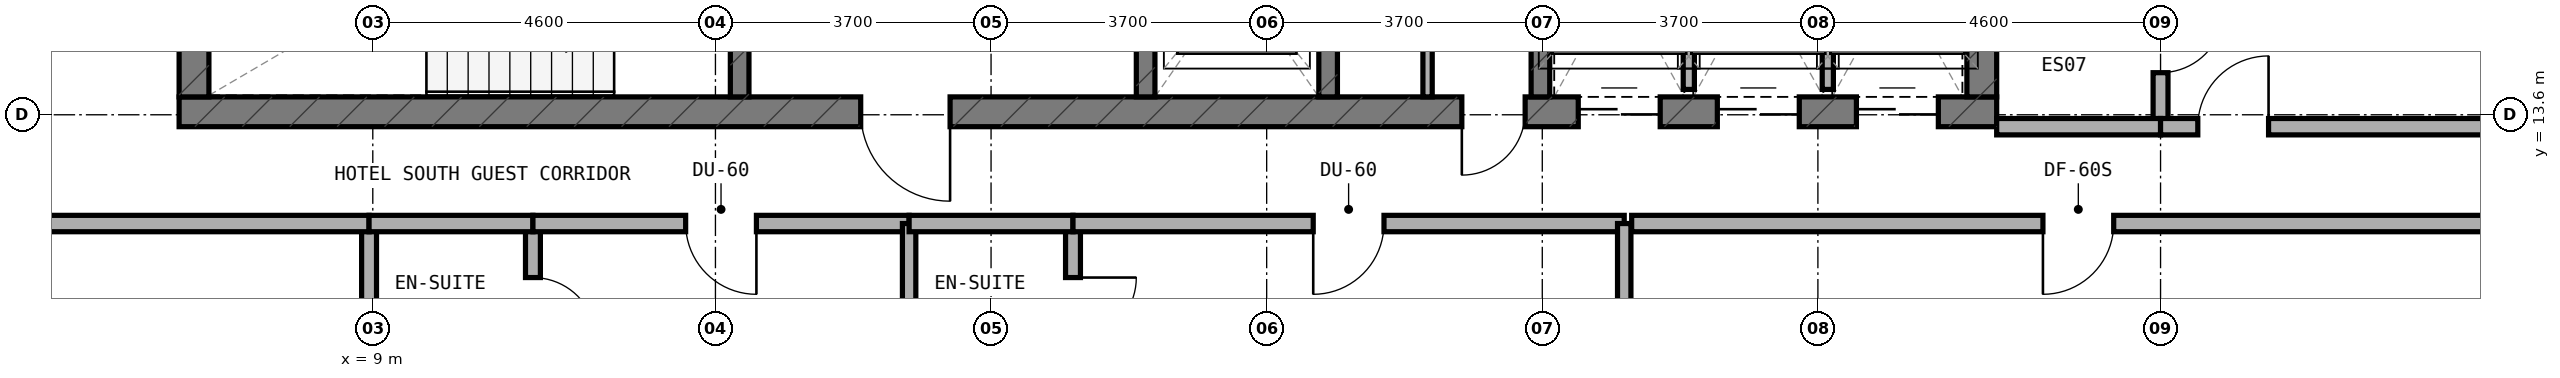
"""IFC4 building model, lengths in metres.
Left out: names, types, materials, properties, quantities, classifications, styles, units other than length and angle.
Written with IfcOpenShell. Run it as: python <this file> out.ifc"""

import sys

from ifc_helpers import new_model, si_unit, direction, frame, frame_2d, origin, place, context, subcontext, project, spatial, rectangle, extrude, element, fill, save


model = new_model("IFC4")
c1 = context("Model", 3, precision=1e-05, world=origin(), true_north=direction((0.0, 1.0)))
c2 = subcontext(c1, "Body", "Model", "MODEL_VIEW")
j1 = project(units=[si_unit("LENGTHUNIT", "METRE"), si_unit("PLANEANGLEUNIT", "RADIAN")], contexts=[c1])
p1 = place(None, origin())
s1 = spatial("IfcSite", under=j1, at=p1, CompositionType="ELEMENT")
p2 = place(p1, origin())
s2 = spatial("IfcBuilding", under=s1, at=p2, CompositionType="ELEMENT")
p3 = place(p2, frame((0.0, 0.0, 246.8)))
s3 = spatial("IfcBuildingStorey", under=s2, at=p3, CompositionType="ELEMENT", Elevation=246.8)
p4 = place(p3, frame((6.4, 13.64, 0.0), z_axis=(0.0, 0.0, 1.0), x_axis=(1.0, 0.0, 0.0)))
e1 = element("IfcWall", 1, at=p4, inside=s3, PredefinedType="SHEAR", context=c2, shape_type="SweptSolid", body=[
    extrude(rectangle(XDim=24.4, YDim=0.4, at=frame_2d((12.2, 0.0))), origin(), (0.0, 0.0, 1.0), 3.6),
])
p5 = place(p4, frame((9.15, 0.0, 0.0)))
e2 = element("IfcOpeningElement", 2, at=p5, cuts=e1, PredefinedType="OPENING", context=c2, shape_type="SweptSolid", body=[
    extrude(rectangle(XDim=1.2, YDim=2.15, at=frame_2d((0.6, 1.075))), frame((0.0, 0.21, 0.0), z_axis=(0.0, -1.0, 0.0), x_axis=(1.0, 0.0, 0.0)), (0.0, 0.0, 1.0), 0.42),
])
p6 = place(p4, frame((17.22, 0.0, 0.0)))
e3 = element("IfcOpeningElement", 3, at=p6, cuts=e1, PredefinedType="OPENING", context=c2, shape_type="SweptSolid", body=[
    extrude(rectangle(XDim=0.85, YDim=2.1, at=frame_2d((0.425, 1.05))), frame((0.0, 0.21, 0.0), z_axis=(0.0, -1.0, 0.0), x_axis=(1.0, 0.0, 0.0)), (0.0, 0.0, 1.0), 0.42),
])
p7 = place(p4, frame((18.783, 0.0, 0.0)))
e4 = element("IfcOpeningElement", 4, at=p7, cuts=e1, PredefinedType="OPENING", context=c2, shape_type="SweptSolid", body=[
    extrude(rectangle(XDim=1.1, YDim=2.15, at=frame_2d((0.55, 1.075))), frame((0.0, 0.21, 0.0), z_axis=(0.0, -1.0, 0.0), x_axis=(1.0, 0.0, 0.0)), (0.0, 0.0, 1.0), 0.42),
])
p8 = place(p4, frame((20.65, 0.0, 0.0)))
e5 = element("IfcOpeningElement", 5, at=p8, cuts=e1, PredefinedType="OPENING", context=c2, shape_type="SweptSolid", body=[
    extrude(rectangle(XDim=1.1, YDim=2.15, at=frame_2d((0.55, 1.075))), frame((0.0, 0.21, 0.0), z_axis=(0.0, -1.0, 0.0), x_axis=(1.0, 0.0, 0.0)), (0.0, 0.0, 1.0), 0.42),
])
p9 = place(p4, frame((22.517, 0.0, 0.0)))
e6 = element("IfcOpeningElement", 6, at=p9, cuts=e1, PredefinedType="OPENING", context=c2, shape_type="SweptSolid", body=[
    extrude(rectangle(XDim=1.1, YDim=2.15, at=frame_2d((0.55, 1.075))), frame((0.0, 0.21, 0.0), z_axis=(0.0, -1.0, 0.0), x_axis=(1.0, 0.0, 0.0)), (0.0, 0.0, 1.0), 0.42),
])
for number, where, z_axis, x_axis in (
    (7, (6.6, 13.84, 0.0), (0.0, 0.0, 1.0), (0.0, 1.0, 0.0)),
    (8, (30.6, 13.84, 0.0), (0.0, 0.0, 1.0), (0.0, 1.0, 0.0)),
):
    element("IfcWall", number, at=place(p3, frame(where, z_axis=z_axis, x_axis=x_axis)), inside=s3, PredefinedType="SHEAR", context=c2, shape_type="SweptSolid", body=[
        extrude(rectangle(XDim=3.16, YDim=0.4, at=frame_2d((1.58, 0.0))), origin(), (0.0, 0.0, 1.0), 3.6),
    ])
p10 = place(p3, frame((13.925, 13.84, 0.0), z_axis=(0.0, 0.0, 1.0), x_axis=(0.0, 1.0, 0.0)))
e9 = element("IfcWall", 9, at=p10, inside=s3, PredefinedType="STANDARD", context=c2, shape_type="SweptSolid", body=[
    extrude(rectangle(XDim=3.16, YDim=0.25, at=frame_2d((1.58, 0.0))), origin(), (0.0, 0.0, 1.0), 3.32),
])
p11 = place(p10, frame((0.98, 0.0, 0.0)))
e10 = element("IfcOpeningElement", 10, at=p11, cuts=e9, PredefinedType="OPENING", context=c2, shape_type="SweptSolid", body=[
    extrude(rectangle(XDim=1.1, YDim=2.15, at=frame_2d((0.55, 1.075))), frame((0.0, 0.135, 0.0), z_axis=(0.0, -1.0, 0.0), x_axis=(1.0, 0.0, 0.0)), (0.0, 0.0, 1.0), 0.27),
])
p12 = place(p3, frame((19.375, 13.84, 0.0), z_axis=(0.0, 0.0, 1.0), x_axis=(0.0, 1.0, 0.0)))
e11 = element("IfcWall", 11, at=p12, inside=s3, PredefinedType="STANDARD", context=c2, shape_type="SweptSolid", body=[
    extrude(rectangle(XDim=3.16, YDim=0.25, at=frame_2d((1.58, 0.0))), origin(), (0.0, 0.0, 1.0), 3.32),
])
p13 = place(p12, frame((0.98, 0.0, 0.0)))
e12 = element("IfcOpeningElement", 12, at=p13, cuts=e11, PredefinedType="OPENING", context=c2, shape_type="SweptSolid", body=[
    extrude(rectangle(XDim=1.1, YDim=2.15, at=frame_2d((0.55, 1.075))), frame((0.0, 0.135, 0.0), z_axis=(0.0, -1.0, 0.0), x_axis=(1.0, 0.0, 0.0)), (0.0, 0.0, 1.0), 0.27),
])
for number, where, z_axis, x_axis in (
    (13, (21.825, 13.84, 0.0), (0.0, 0.0, 1.0), (0.0, 1.0, 0.0)),
    (14, (24.675, 13.84, 0.0), (0.0, 0.0, 1.0), (0.0, 1.0, 0.0)),
):
    element("IfcWall", number, at=place(p3, frame(where, z_axis=z_axis, x_axis=x_axis)), inside=s3, PredefinedType="STANDARD", context=c2, shape_type="SweptSolid", body=[
        extrude(rectangle(XDim=3.16, YDim=0.25, at=frame_2d((1.58, 0.0))), origin(), (0.0, 0.0, 1.0), 3.32),
    ])
p14 = place(p3, frame((23.16, 13.84, 0.0), z_axis=(0.0, 0.0, 1.0), x_axis=(0.0, 1.0, 0.0)))
e15 = element("IfcWall", 15, at=p14, inside=s3, PredefinedType="PARTITIONING", context=c2, shape_type="SweptSolid", body=[
    extrude(rectangle(XDim=1.34, YDim=0.125, at=frame_2d((0.67, 0.0))), origin(), (0.0, 0.0, 1.0), 3.32),
])
p15 = place(p3, frame((26.667, 13.94, 0.0), z_axis=(0.0, 0.0, 1.0), x_axis=(0.0, 1.0, 0.0)))
e16 = element("IfcWall", 16, at=p15, inside=s3, PredefinedType="PARTITIONING", context=c2, shape_type="SweptSolid", body=[
    extrude(rectangle(XDim=2.96, YDim=0.15, at=frame_2d((1.48, 0.0))), origin(), (0.0, 0.0, 1.0), 3.32),
])
p16 = place(p3, frame((28.533, 13.94, 0.0), z_axis=(0.0, 0.0, 1.0), x_axis=(0.0, 1.0, 0.0)))
e17 = element("IfcWall", 17, at=p16, inside=s3, PredefinedType="PARTITIONING", context=c2, shape_type="SweptSolid", body=[
    extrude(rectangle(XDim=2.96, YDim=0.15, at=frame_2d((1.48, 0.0))), origin(), (0.0, 0.0, 1.0), 2.745),
])
p17 = place(p3, frame((11.15, 9.94, 0.0), z_axis=(0.0, 0.0, 1.0), x_axis=(0.0, 1.0, 0.0)))
e18 = element("IfcWall", 18, at=p17, inside=s3, PredefinedType="PLUMBINGWALL", context=c2, shape_type="SweptSolid", body=[
    extrude(rectangle(XDim=2.1, YDim=0.2, at=frame_2d((1.05, 0.0))), origin(), (0.0, 0.0, 1.0), 3.025),
])
p18 = place(p17, frame((0.625, 0.0, 0.0)))
e19 = element("IfcOpeningElement", 19, at=p18, cuts=e18, PredefinedType="OPENING", context=c2, shape_type="SweptSolid", body=[
    extrude(rectangle(XDim=0.85, YDim=2.1, at=frame_2d((0.425, 1.05))), frame((0.0, 0.11, 0.0), z_axis=(0.0, -1.0, 0.0), x_axis=(1.0, 0.0, 0.0)), (0.0, 0.0, 1.0), 0.22),
])
p19 = place(p3, frame((8.95, 9.94, 0.0), z_axis=(0.0, 0.0, 1.0), x_axis=(0.0, 1.0, 0.0)))
e20 = element("IfcWall", 20, at=p19, inside=s3, PredefinedType="PLUMBINGWALL", context=c2, shape_type="SweptSolid", body=[
    extrude(rectangle(XDim=2.1, YDim=0.2, at=frame_2d((1.05, 0.0))), origin(), (0.0, 0.0, 1.0), 3.025),
])
p20 = place(p3, frame((2.76, 12.14, 0.0), z_axis=(0.0, 0.0, 1.0), x_axis=(1.0, 0.0, 0.0)))
e21 = element("IfcWall", 21, at=p20, inside=s3, PredefinedType="SOLIDWALL", context=c2, shape_type="SweptSolid", body=[
    extrude(rectangle(XDim=6.19, YDim=0.22, at=frame_2d((3.095, 0.0))), origin(), (0.0, 0.0, 1.0), 2.745),
])
p21 = place(p3, frame((8.95, 12.14, 0.0), z_axis=(0.0, 0.0, 1.0), x_axis=(1.0, 0.0, 0.0)))
e22 = element("IfcWall", 22, at=p21, inside=s3, PredefinedType="SOLIDWALL", context=c2, shape_type="SweptSolid", body=[
    extrude(rectangle(XDim=2.2, YDim=0.22, at=frame_2d((1.1, 0.0))), origin(), (0.0, 0.0, 1.0), 3.32),
])
p22 = place(p3, frame((11.15, 12.14, 0.0), z_axis=(0.0, 0.0, 1.0), x_axis=(1.0, 0.0, 0.0)))
e23 = element("IfcWall", 23, at=p22, inside=s3, PredefinedType="SOLIDWALL", context=c2, shape_type="SweptSolid", body=[
    extrude(rectangle(XDim=5.05, YDim=0.22, at=frame_2d((2.525, 0.0))), origin(), (0.0, 0.0, 1.0), 2.745),
])
p23 = place(p22, frame((2.05, 0.0, 0.0)))
e24 = element("IfcOpeningElement", 24, at=p23, cuts=e23, PredefinedType="OPENING", context=c2, shape_type="SweptSolid", body=[
    extrude(rectangle(XDim=0.95, YDim=2.1, at=frame_2d((0.475, 1.05))), frame((0.0, 0.12, 0.0), z_axis=(0.0, -1.0, 0.0), x_axis=(1.0, 0.0, 0.0)), (0.0, 0.0, 1.0), 0.24),
])
p24 = place(p3, frame((16.2, 6.46, 0.0), z_axis=(0.0, 0.0, 1.0), x_axis=(0.0, 1.0, 0.0)))
e25 = element("IfcWall", 25, at=p24, inside=s3, PredefinedType="SOLIDWALL", context=c2, shape_type="SweptSolid", body=[
    extrude(rectangle(XDim=5.68, YDim=0.18, at=frame_2d((2.84, 0.0))), origin(), (0.0, 0.0, 1.0), 2.745),
])
p25 = place(p3, frame((18.4, 9.94, 0.0), z_axis=(0.0, 0.0, 1.0), x_axis=(0.0, 1.0, 0.0)))
e26 = element("IfcWall", 26, at=p25, inside=s3, PredefinedType="PLUMBINGWALL", context=c2, shape_type="SweptSolid", body=[
    extrude(rectangle(XDim=2.1, YDim=0.2, at=frame_2d((1.05, 0.0))), origin(), (0.0, 0.0, 1.0), 3.025),
])
p26 = place(p25, frame((0.625, 0.0, 0.0)))
e27 = element("IfcOpeningElement", 27, at=p26, cuts=e26, PredefinedType="OPENING", context=c2, shape_type="SweptSolid", body=[
    extrude(rectangle(XDim=0.85, YDim=2.1, at=frame_2d((0.425, 1.05))), frame((0.0, 0.11, 0.0), z_axis=(0.0, -1.0, 0.0), x_axis=(1.0, 0.0, 0.0)), (0.0, 0.0, 1.0), 0.22),
])
p27 = place(p3, frame((16.2, 12.14, 0.0), z_axis=(0.0, 0.0, 1.0), x_axis=(1.0, 0.0, 0.0)))
e28 = element("IfcWall", 28, at=p27, inside=s3, PredefinedType="SOLIDWALL", context=c2, shape_type="SweptSolid", body=[
    extrude(rectangle(XDim=2.2, YDim=0.22, at=frame_2d((1.1, 0.0))), origin(), (0.0, 0.0, 1.0), 2.745),
])
p28 = place(p3, frame((18.4, 12.14, 0.0), z_axis=(0.0, 0.0, 1.0), x_axis=(1.0, 0.0, 0.0)))
e29 = element("IfcWall", 29, at=p28, inside=s3, PredefinedType="SOLIDWALL", context=c2, shape_type="SweptSolid", body=[
    extrude(rectangle(XDim=7.4, YDim=0.22, at=frame_2d((3.7, 0.0))), origin(), (0.0, 0.0, 1.0), 2.745),
])
p29 = place(p28, frame((3.225, 0.0, 0.0)))
e30 = element("IfcOpeningElement", 30, at=p29, cuts=e29, PredefinedType="OPENING", context=c2, shape_type="SweptSolid", body=[
    extrude(rectangle(XDim=0.95, YDim=2.1, at=frame_2d((0.475, 1.05))), frame((0.0, 0.12, 0.0), z_axis=(0.0, -1.0, 0.0), x_axis=(1.0, 0.0, 0.0)), (0.0, 0.0, 1.0), 0.24),
])
p30 = place(p3, frame((25.8, 6.46, 0.0), z_axis=(0.0, 0.0, 1.0), x_axis=(0.0, 1.0, 0.0)))
e31 = element("IfcWall", 31, at=p30, inside=s3, PredefinedType="SOLIDWALL", context=c2, shape_type="SweptSolid", body=[
    extrude(rectangle(XDim=5.68, YDim=0.18, at=frame_2d((2.84, 0.0))), origin(), (0.0, 0.0, 1.0), 2.745),
])
p31 = place(p3, frame((25.9, 12.14, 0.0), z_axis=(0.0, 0.0, 1.0), x_axis=(1.0, 0.0, 0.0)))
e32 = element("IfcWall", 32, at=p31, inside=s3, PredefinedType="SOLIDWALL", context=c2, shape_type="SweptSolid", body=[
    extrude(rectangle(XDim=13.24, YDim=0.22, at=frame_2d((6.62, 0.0))), origin(), (0.0, 0.0, 1.0), 2.745),
])
p32 = place(p31, frame((5.521, 0.0, 0.0)))
e33 = element("IfcOpeningElement", 33, at=p32, cuts=e32, PredefinedType="OPENING", context=c2, shape_type="SweptSolid", body=[
    extrude(rectangle(XDim=0.95, YDim=2.1, at=frame_2d((0.475, 1.05))), frame((0.0, 0.12, 0.0), z_axis=(0.0, -1.0, 0.0), x_axis=(1.0, 0.0, 0.0)), (0.0, 0.0, 1.0), 0.24),
])
p33 = place(p3, frame((33.0, 13.54, 0.0), z_axis=(0.0, 0.0, 1.0), x_axis=(0.0, 1.0, 0.0)))
e34 = element("IfcWall", 34, at=p33, inside=s3, PredefinedType="PLUMBINGWALL", context=c2, shape_type="SweptSolid", body=[
    extrude(rectangle(XDim=2.1, YDim=0.2, at=frame_2d((1.05, 0.0))), origin(), (0.0, 0.0, 1.0), 3.32),
])
p34 = place(p33, frame((0.625, 0.0, 0.0)))
e35 = element("IfcOpeningElement", 35, at=p34, cuts=e34, PredefinedType="OPENING", context=c2, shape_type="SweptSolid", body=[
    extrude(rectangle(XDim=0.85, YDim=2.1, at=frame_2d((0.425, 1.05))), frame((0.0, 0.11, 0.0), z_axis=(0.0, -1.0, 0.0), x_axis=(1.0, 0.0, 0.0)), (0.0, 0.0, 1.0), 0.22),
])
p35 = place(p3, frame((30.8, 13.44, 0.0), z_axis=(0.0, 0.0, 1.0), x_axis=(1.0, 0.0, 0.0)))
e36 = element("IfcWall", 36, at=p35, inside=s3, PredefinedType="SOLIDWALL", context=c2, shape_type="SweptSolid", body=[
    extrude(rectangle(XDim=2.2, YDim=0.22, at=frame_2d((1.1, 0.0))), origin(), (0.0, 0.0, 1.0), 3.32),
])
p36 = place(p3, frame((33.0, 13.44, 0.0), z_axis=(0.0, 0.0, 1.0), x_axis=(1.0, 0.0, 0.0)))
e37 = element("IfcWall", 37, at=p36, inside=s3, PredefinedType="SOLIDWALL", context=c2, shape_type="SweptSolid", body=[
    extrude(rectangle(XDim=6.4, YDim=0.22, at=frame_2d((3.2, 0.0))), origin(), (0.0, 0.0, 1.0), 2.745),
])
p37 = place(p36, frame((0.5, 0.0, 0.0)))
e38 = element("IfcOpeningElement", 38, at=p37, cuts=e37, PredefinedType="OPENING", context=c2, shape_type="SweptSolid", body=[
    extrude(rectangle(XDim=0.95, YDim=2.1, at=frame_2d((0.475, 1.05))), frame((0.0, 0.12, 0.0), z_axis=(0.0, -1.0, 0.0), x_axis=(1.0, 0.0, 0.0)), (0.0, 0.0, 1.0), 0.24),
])
p38 = place(p5, frame((1.2, 0.0, 0.0), z_axis=(0.0, 0.0, 1.0), x_axis=(-1.0, 0.0, 0.0)))
e39 = element("IfcDoor", 39, at=p38, inside=s3, OperationType="SINGLE_SWING_LEFT", PredefinedType="DOOR", context=c2, shape_type="SweptSolid", body=[
    extrude(rectangle(XDim=1.2, YDim=2.15, at=frame_2d((0.6, 1.075))), frame((0.0, 0.025, 0.0), z_axis=(0.0, -1.0, 0.0), x_axis=(1.0, 0.0, 0.0)), (0.0, 0.0, 1.0), 0.05),
])
fill(e2, e39)
p39 = place(p6, frame((0.85, 0.0, 0.0), z_axis=(0.0, 0.0, 1.0), x_axis=(-1.0, 0.0, 0.0)))
e40 = element("IfcDoor", 40, at=p39, inside=s3, OperationType="SINGLE_SWING_RIGHT", PredefinedType="DOOR", context=c2, shape_type="SweptSolid", body=[
    extrude(rectangle(XDim=0.85, YDim=2.1, at=frame_2d((0.425, 1.05))), frame((0.0, 0.025, 0.0), z_axis=(0.0, -1.0, 0.0), x_axis=(1.0, 0.0, 0.0)), (0.0, 0.0, 1.0), 0.05),
])
fill(e3, e40)
p40 = place(p7, frame((1.1, 0.0, 0.0), z_axis=(0.0, 0.0, 1.0), x_axis=(-1.0, 0.0, 0.0)))
e41 = element("IfcDoor", 41, at=p40, inside=s3, OperationType="DOUBLE_DOOR_SLIDING", PredefinedType="DOOR", context=c2, shape_type="SweptSolid", body=[
    extrude(rectangle(XDim=1.1, YDim=2.15, at=frame_2d((0.55, 1.075))), frame((0.0, 0.025, 0.0), z_axis=(0.0, -1.0, 0.0), x_axis=(1.0, 0.0, 0.0)), (0.0, 0.0, 1.0), 0.05),
])
fill(e4, e41)
p41 = place(p8, frame((1.1, 0.0, 0.0), z_axis=(0.0, 0.0, 1.0), x_axis=(-1.0, 0.0, 0.0)))
e42 = element("IfcDoor", 42, at=p41, inside=s3, OperationType="DOUBLE_DOOR_SLIDING", PredefinedType="DOOR", context=c2, shape_type="SweptSolid", body=[
    extrude(rectangle(XDim=1.1, YDim=2.15, at=frame_2d((0.55, 1.075))), frame((0.0, 0.025, 0.0), z_axis=(0.0, -1.0, 0.0), x_axis=(1.0, 0.0, 0.0)), (0.0, 0.0, 1.0), 0.05),
])
fill(e5, e42)
p42 = place(p9, frame((1.1, 0.0, 0.0), z_axis=(0.0, 0.0, 1.0), x_axis=(-1.0, 0.0, 0.0)))
e43 = element("IfcDoor", 43, at=p42, inside=s3, OperationType="DOUBLE_DOOR_SLIDING", PredefinedType="DOOR", context=c2, shape_type="SweptSolid", body=[
    extrude(rectangle(XDim=1.1, YDim=2.15, at=frame_2d((0.55, 1.075))), frame((0.0, 0.025, 0.0), z_axis=(0.0, -1.0, 0.0), x_axis=(1.0, 0.0, 0.0)), (0.0, 0.0, 1.0), 0.05),
])
fill(e6, e43)
p43 = place(p18, frame((0.85, 0.0, 0.0), z_axis=(0.0, 0.0, 1.0), x_axis=(-1.0, 0.0, 0.0)))
e44 = element("IfcDoor", 44, at=p43, inside=s3, OperationType="SINGLE_SWING_RIGHT", PredefinedType="DOOR", context=c2, shape_type="SweptSolid", body=[
    extrude(rectangle(XDim=0.85, YDim=2.1, at=frame_2d((0.425, 1.05))), frame((0.0, 0.025, 0.0), z_axis=(0.0, -1.0, 0.0), x_axis=(1.0, 0.0, 0.0)), (0.0, 0.0, 1.0), 0.05),
])
fill(e19, e44)
p44 = place(p23, frame((0.95, 0.0, 0.0), z_axis=(0.0, 0.0, 1.0), x_axis=(-1.0, 0.0, 0.0)))
e45 = element("IfcDoor", 45, at=p44, inside=s3, OperationType="SINGLE_SWING_LEFT", PredefinedType="DOOR", context=c2, shape_type="SweptSolid", body=[
    extrude(rectangle(XDim=0.95, YDim=2.1, at=frame_2d((0.475, 1.05))), frame((0.0, 0.025, 0.0), z_axis=(0.0, -1.0, 0.0), x_axis=(1.0, 0.0, 0.0)), (0.0, 0.0, 1.0), 0.05),
])
fill(e24, e45)
p45 = place(p26, frame((0.85, 0.0, 0.0), z_axis=(0.0, 0.0, 1.0), x_axis=(-1.0, 0.0, 0.0)))
e46 = element("IfcDoor", 46, at=p45, inside=s3, OperationType="SINGLE_SWING_LEFT", PredefinedType="DOOR", context=c2, shape_type="SweptSolid", body=[
    extrude(rectangle(XDim=0.85, YDim=2.1, at=frame_2d((0.425, 1.05))), frame((0.0, 0.025, 0.0), z_axis=(0.0, -1.0, 0.0), x_axis=(1.0, 0.0, 0.0)), (0.0, 0.0, 1.0), 0.05),
])
fill(e27, e46)
p46 = place(p29, frame((0.95, 0.0, 0.0), z_axis=(0.0, 0.0, 1.0), x_axis=(-1.0, 0.0, 0.0)))
e47 = element("IfcDoor", 47, at=p46, inside=s3, OperationType="SINGLE_SWING_RIGHT", PredefinedType="DOOR", context=c2, shape_type="SweptSolid", body=[
    extrude(rectangle(XDim=0.95, YDim=2.1, at=frame_2d((0.475, 1.05))), frame((0.0, 0.025, 0.0), z_axis=(0.0, -1.0, 0.0), x_axis=(1.0, 0.0, 0.0)), (0.0, 0.0, 1.0), 0.05),
])
fill(e30, e47)
p47 = place(p32, frame((0.95, 0.0, 0.0), z_axis=(0.0, 0.0, 1.0), x_axis=(-1.0, 0.0, 0.0)))
e48 = element("IfcDoor", 48, at=p47, inside=s3, OperationType="SINGLE_SWING_RIGHT", PredefinedType="DOOR", context=c2, shape_type="SweptSolid", body=[
    extrude(rectangle(XDim=0.95, YDim=2.1, at=frame_2d((0.475, 1.05))), frame((0.0, 0.025, 0.0), z_axis=(0.0, -1.0, 0.0), x_axis=(1.0, 0.0, 0.0)), (0.0, 0.0, 1.0), 0.05),
])
fill(e33, e48)
p48 = place(p34, frame((0.85, 0.0, 0.0), z_axis=(0.0, 0.0, 1.0), x_axis=(-1.0, 0.0, 0.0)))
e49 = element("IfcDoor", 49, at=p48, inside=s3, OperationType="SINGLE_SWING_LEFT", PredefinedType="DOOR", context=c2, shape_type="SweptSolid", body=[
    extrude(rectangle(XDim=0.85, YDim=2.1, at=frame_2d((0.425, 1.05))), frame((0.0, 0.025, 0.0), z_axis=(0.0, -1.0, 0.0), x_axis=(1.0, 0.0, 0.0)), (0.0, 0.0, 1.0), 0.05),
])
fill(e35, e49)
p49 = place(p37, origin())
e50 = element("IfcDoor", 50, at=p49, inside=s3, OperationType="SINGLE_SWING_RIGHT", PredefinedType="DOOR", context=c2, shape_type="SweptSolid", body=[
    extrude(rectangle(XDim=0.95, YDim=2.1, at=frame_2d((0.475, 1.05))), frame((0.0, 0.025, 0.0), z_axis=(0.0, -1.0, 0.0), x_axis=(1.0, 0.0, 0.0)), (0.0, 0.0, 1.0), 0.05),
])
fill(e38, e50)
save(model, sys.argv[1])
